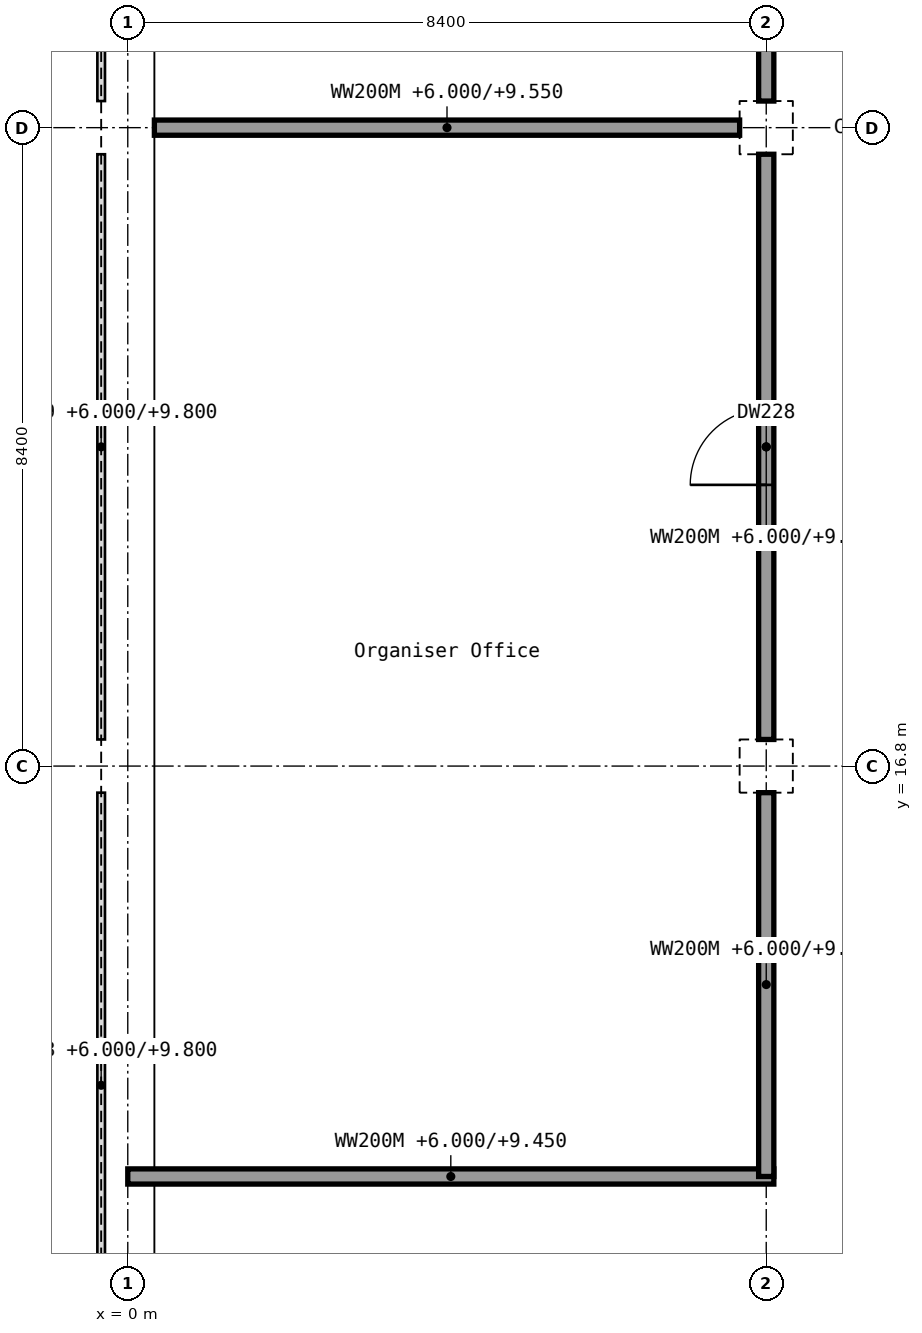
"""IFC4 building model, lengths in metres.
Left out: names, types, materials, properties, quantities, classifications, styles, units other than length and angle.
Written with IfcOpenShell. Run it as: python <this file> out.ifc"""

import sys

from ifc_helpers import new_model, si_unit, direction, frame, frame_2d, origin, origin_2d, place, context, subcontext, project, spatial, rectangle, extrude, element, fill, save


model = new_model("IFC4")
c1 = context("Model", 3, precision=1e-05, world=origin(), true_north=direction((0.0, 1.0)))
c2 = subcontext(c1, "Body", "Model", "MODEL_VIEW")
j1 = project(units=[si_unit("LENGTHUNIT", "METRE"), si_unit("PLANEANGLEUNIT", "RADIAN")], contexts=[c1])
p1 = place(None, origin())
s1 = spatial("IfcSite", under=j1, at=p1, CompositionType="ELEMENT")
p2 = place(p1, origin())
s2 = spatial("IfcBuilding", under=s1, at=p2, CompositionType="ELEMENT")
p3 = place(p2, frame((0.0, 0.0, 6.0)))
s3 = spatial("IfcBuildingStorey", under=s2, at=p3, CompositionType="ELEMENT", Elevation=6.0)
for number, where, z_axis, x_axis in (
    (1, (0.0, 16.8, 0.0), (0.0, 0.0, 1.0), (1.0, 0.0, 0.0)),
    (2, (0.0, 25.2, 0.0), (0.0, 0.0, 1.0), (1.0, 0.0, 0.0)),
    (3, (8.4, 16.8, 0.0), (0.0, 0.0, 1.0), (1.0, 0.0, 0.0)),
    (4, (8.4, 25.2, 0.0), (0.0, 0.0, 1.0), (1.0, 0.0, 0.0)),
):
    element("IfcColumn", number, at=place(p3, frame(where, z_axis=z_axis, x_axis=x_axis)), inside=s3, PredefinedType="COLUMN", context=c2, shape_type="SweptSolid", body=[
        extrude(rectangle(XDim=0.7, YDim=0.7, at=origin_2d()), origin(), (0.0, 0.0, 1.0), 4.5),
    ])
p4 = place(p3, frame((0.0, 11.4, 0.0), z_axis=(0.0, 0.0, 1.0), x_axis=(1.0, 0.0, 0.0)))
e5 = element("IfcWall", 5, at=p4, inside=s3, PredefinedType="PARTITIONING", context=c2, shape_type="SweptSolid", body=[
    extrude(rectangle(XDim=8.5, YDim=0.2, at=frame_2d((4.25, 0.0))), origin(), (0.0, 0.0, 1.0), 3.45),
])
p5 = place(p3, frame((0.35, 25.2, 0.0), z_axis=(0.0, 0.0, 1.0), x_axis=(1.0, 0.0, 0.0)))
e6 = element("IfcWall", 6, at=p5, inside=s3, PredefinedType="PARTITIONING", context=c2, shape_type="SweptSolid", body=[
    extrude(rectangle(XDim=7.7, YDim=0.2, at=frame_2d((3.85, 0.0))), origin(), (0.0, 0.0, 1.0), 3.55),
])
p6 = place(p3, frame((8.4, 11.4, 0.0), z_axis=(0.0, 0.0, 1.0), x_axis=(0.0, 1.0, 0.0)))
e7 = element("IfcWall", 7, at=p6, inside=s3, PredefinedType="PARTITIONING", context=c2, shape_type="SweptSolid", body=[
    extrude(rectangle(XDim=5.05, YDim=0.2, at=frame_2d((2.525, 0.0))), origin(), (0.0, 0.0, 1.0), 3.55),
])
p7 = place(p3, frame((8.4, 17.15, 0.0), z_axis=(0.0, 0.0, 1.0), x_axis=(0.0, 1.0, 0.0)))
e8 = element("IfcWall", 8, at=p7, inside=s3, PredefinedType="PARTITIONING", context=c2, shape_type="SweptSolid", body=[
    extrude(rectangle(XDim=7.7, YDim=0.2, at=frame_2d((3.85, 0.0))), origin(), (0.0, 0.0, 1.0), 3.55),
])
p8 = place(p7, frame((3.35, 0.0, 0.0)))
e9 = element("IfcOpeningElement", 9, at=p8, cuts=e8, PredefinedType="OPENING", context=c2, shape_type="SweptSolid", body=[
    extrude(rectangle(XDim=1.0, YDim=2.1, at=frame_2d((0.5, 1.05))), frame((0.0, 0.1, 0.0), z_axis=(0.0, -1.0, 0.0), x_axis=(1.0, 0.0, 0.0)), (0.0, 0.0, 1.0), 0.2),
])
p9 = place(p3, frame((8.4, 25.55, 0.0), z_axis=(0.0, 0.0, 1.0), x_axis=(0.0, 1.0, 0.0)))
e10 = element("IfcWall", 10, at=p9, inside=s3, PredefinedType="PARTITIONING", context=c2, shape_type="SweptSolid", body=[
    extrude(rectangle(XDim=7.7, YDim=0.2, at=frame_2d((3.85, 0.0))), origin(), (0.0, 0.0, 1.0), 3.55),
])
p10 = place(p9, frame((3.35, 0.0, 0.0)))
e11 = element("IfcOpeningElement", 11, at=p10, cuts=e10, PredefinedType="OPENING", context=c2, shape_type="SweptSolid", body=[
    extrude(rectangle(XDim=1.0, YDim=2.1, at=frame_2d((0.5, 1.05))), frame((0.0, 0.1, 0.0), z_axis=(0.0, -1.0, 0.0), x_axis=(1.0, 0.0, 0.0)), (0.0, 0.0, 1.0), 0.2),
])
p11 = place(p8, origin())
e12 = element("IfcDoor", 12, at=p11, inside=s3, OperationType="SINGLE_SWING_LEFT", PredefinedType="DOOR", context=c2, shape_type="SweptSolid", body=[
    extrude(rectangle(XDim=1.0, YDim=2.1, at=frame_2d((0.5, 1.05))), frame((0.0, 0.025, 0.0), z_axis=(0.0, -1.0, 0.0), x_axis=(1.0, 0.0, 0.0)), (0.0, 0.0, 1.0), 0.05),
])
fill(e9, e12)
save(model, sys.argv[1])
